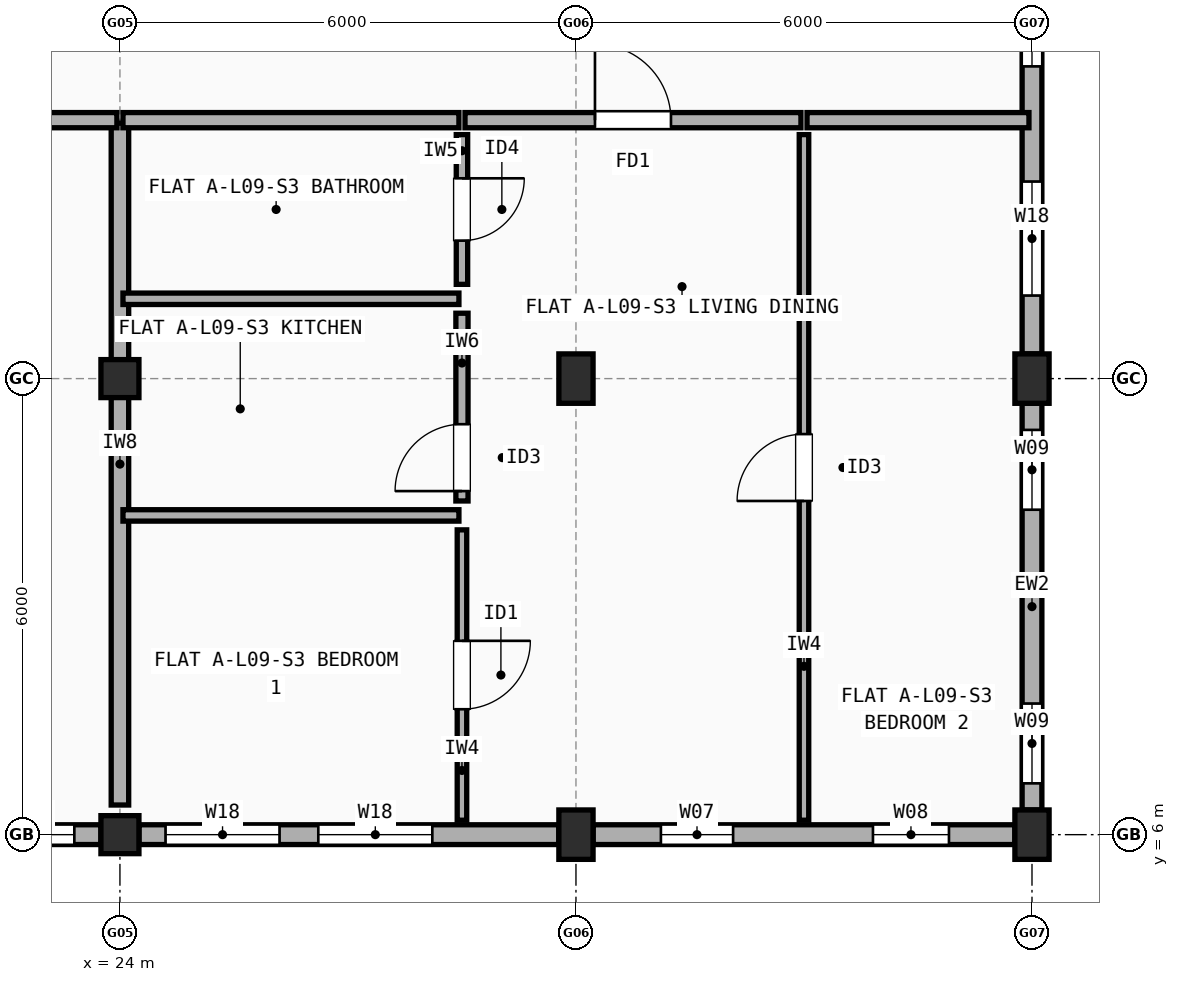
"""IFC4 building model, lengths in metres.
Left out: names, types, materials, properties, quantities, classifications, styles, units other than length and angle.
Written with IfcOpenShell. Run it as: python <this file> out.ifc"""

import sys

from ifc_helpers import new_model, si_unit, direction, frame, frame_2d, origin, origin_2d, place, context, subcontext, project, spatial, rectangle, extrude, element, fill, save


model = new_model("IFC4")
c1 = context("Model", 3, precision=1e-05, world=origin(), true_north=direction((0.0, 1.0)))
c2 = subcontext(c1, "Body", "Model", "MODEL_VIEW")
j1 = project(units=[si_unit("LENGTHUNIT", "METRE"), si_unit("PLANEANGLEUNIT", "RADIAN")], contexts=[c1])
p1 = place(None, origin())
s1 = spatial("IfcSite", under=j1, at=p1, CompositionType="ELEMENT")
p2 = place(p1, origin())
s2 = spatial("IfcBuilding", under=s1, at=p2, CompositionType="ELEMENT")
p3 = place(p2, frame((0.0, 0.0, 30.1)))
s3 = spatial("IfcBuildingStorey", under=s2, at=p3, CompositionType="ELEMENT", Elevation=30.1)
for number, where, z_axis, x_axis in (
    (1, (24.0, 6.0, 0.0), (0.0, 0.0, 1.0), (1.0, 0.0, 0.0)),
    (2, (24.0, 12.0, 0.0), (0.0, 0.0, 1.0), (1.0, 0.0, 0.0)),
):
    element("IfcColumn", number, at=place(p3, frame(where, z_axis=z_axis, x_axis=x_axis)), inside=s3, PredefinedType="COLUMN", context=c2, shape_type="SweptSolid", body=[
        extrude(rectangle(XDim=0.5, YDim=0.5, at=origin_2d()), origin(), (0.0, 0.0, 1.0), 2.985),
    ])
for number, where, z_axis, x_axis in (
    (3, (30.0, 6.0, 0.0), (0.0, 0.0, 1.0), (1.0, 0.0, 0.0)),
    (4, (30.0, 12.0, 0.0), (0.0, 0.0, 1.0), (1.0, 0.0, 0.0)),
    (5, (36.0, 6.0, 0.0), (0.0, 0.0, 1.0), (1.0, 0.0, 0.0)),
    (6, (36.0, 12.0, 0.0), (0.0, 0.0, 1.0), (1.0, 0.0, 0.0)),
):
    element("IfcColumn", number, at=place(p3, frame(where, z_axis=z_axis, x_axis=x_axis)), inside=s3, PredefinedType="COLUMN", context=c2, shape_type="SweptSolid", body=[
        extrude(rectangle(XDim=0.45, YDim=0.65, at=origin_2d()), origin(), (0.0, 0.0, 1.0), 2.985),
    ])
p4 = place(p3, frame((18.25, 6.0, 0.0), z_axis=(0.0, 0.0, 1.0), x_axis=(1.0, 0.0, 0.0)))
e7 = element("IfcWall", 7, at=p4, inside=s3, PredefinedType="STANDARD", context=c2, shape_type="SweptSolid", body=[
    extrude(rectangle(XDim=5.5, YDim=0.26, at=frame_2d((2.75, 0.0))), origin(), (0.0, 0.0, 1.0), 2.467),
])
p5 = place(p4, frame((0.35, 0.0, 0.9)))
e8 = element("IfcOpeningElement", 8, at=p5, cuts=e7, PredefinedType="OPENING", context=c2, shape_type="SweptSolid", body=[
    extrude(rectangle(XDim=1.05, YDim=1.35, at=frame_2d((0.525, 0.675))), frame((0.0, 0.14, 0.0), z_axis=(0.0, -1.0, 0.0), x_axis=(1.0, 0.0, 0.0)), (0.0, 0.0, 1.0), 0.28),
])
p6 = place(p4, frame((4.1, 0.0, 0.9)))
e9 = element("IfcOpeningElement", 9, at=p6, cuts=e7, PredefinedType="OPENING", context=c2, shape_type="SweptSolid", body=[
    extrude(rectangle(XDim=1.05, YDim=1.35, at=frame_2d((0.525, 0.675))), frame((0.0, 0.14, 0.0), z_axis=(0.0, -1.0, 0.0), x_axis=(1.0, 0.0, 0.0)), (0.0, 0.0, 1.0), 0.28),
])
p7 = place(p3, frame((24.25, 6.0, 0.0), z_axis=(0.0, 0.0, 1.0), x_axis=(1.0, 0.0, 0.0)))
e10 = element("IfcWall", 10, at=p7, inside=s3, PredefinedType="STANDARD", context=c2, shape_type="SweptSolid", body=[
    extrude(rectangle(XDim=5.525, YDim=0.26, at=frame_2d((2.762, 0.0))), origin(), (0.0, 0.0, 1.0), 2.467),
])
p8 = place(p7, frame((0.35, 0.0, 0.9)))
e11 = element("IfcOpeningElement", 11, at=p8, cuts=e10, PredefinedType="OPENING", context=c2, shape_type="SweptSolid", body=[
    extrude(rectangle(XDim=1.5, YDim=1.4, at=frame_2d((0.75, 0.7))), frame((0.0, 0.14, 0.0), z_axis=(0.0, -1.0, 0.0), x_axis=(1.0, 0.0, 0.0)), (0.0, 0.0, 1.0), 0.28),
])
p9 = place(p7, frame((2.36, 0.0, 0.9)))
e12 = element("IfcOpeningElement", 12, at=p9, cuts=e10, PredefinedType="OPENING", context=c2, shape_type="SweptSolid", body=[
    extrude(rectangle(XDim=1.5, YDim=1.4, at=frame_2d((0.75, 0.7))), frame((0.0, 0.14, 0.0), z_axis=(0.0, -1.0, 0.0), x_axis=(1.0, 0.0, 0.0)), (0.0, 0.0, 1.0), 0.28),
])
p10 = place(p3, frame((30.225, 6.0, 0.0), z_axis=(0.0, 0.0, 1.0), x_axis=(1.0, 0.0, 0.0)))
e13 = element("IfcWall", 13, at=p10, inside=s3, PredefinedType="STANDARD", context=c2, shape_type="SweptSolid", body=[
    extrude(rectangle(XDim=5.55, YDim=0.26, at=frame_2d((2.775, 0.0))), origin(), (0.0, 0.0, 1.0), 2.467),
])
p11 = place(p10, frame((0.893, 0.0, 0.9)))
e14 = element("IfcOpeningElement", 14, at=p11, cuts=e13, PredefinedType="OPENING", context=c2, shape_type="SweptSolid", body=[
    extrude(rectangle(XDim=0.95, YDim=1.35, at=frame_2d((0.475, 0.675))), frame((0.0, 0.14, 0.0), z_axis=(0.0, -1.0, 0.0), x_axis=(1.0, 0.0, 0.0)), (0.0, 0.0, 1.0), 0.28),
])
p12 = place(p10, frame((3.683, 0.0, 0.9)))
e15 = element("IfcOpeningElement", 15, at=p12, cuts=e13, PredefinedType="OPENING", context=c2, shape_type="SweptSolid", body=[
    extrude(rectangle(XDim=1.0, YDim=1.4, at=frame_2d((0.5, 0.7))), frame((0.0, 0.14, 0.0), z_axis=(0.0, -1.0, 0.0), x_axis=(1.0, 0.0, 0.0)), (0.0, 0.0, 1.0), 0.28),
])
p13 = place(p3, frame((36.0, 6.325, 0.0), z_axis=(0.0, 0.0, 1.0), x_axis=(0.0, 1.0, 0.0)))
e16 = element("IfcWall", 16, at=p13, inside=s3, PredefinedType="STANDARD", context=c2, shape_type="SweptSolid", body=[
    extrude(rectangle(XDim=5.35, YDim=0.26, at=frame_2d((2.675, 0.0))), origin(), (0.0, 0.0, 1.0), 2.467),
])
p14 = place(p13, frame((0.35, 0.0, 0.9)))
e17 = element("IfcOpeningElement", 17, at=p14, cuts=e16, PredefinedType="OPENING", context=c2, shape_type="SweptSolid", body=[
    extrude(rectangle(XDim=1.05, YDim=1.35, at=frame_2d((0.525, 0.675))), frame((0.0, 0.14, 0.0), z_axis=(0.0, -1.0, 0.0), x_axis=(1.0, 0.0, 0.0)), (0.0, 0.0, 1.0), 0.28),
])
p15 = place(p13, frame((3.95, 0.0, 0.9)))
e18 = element("IfcOpeningElement", 18, at=p15, cuts=e16, PredefinedType="OPENING", context=c2, shape_type="SweptSolid", body=[
    extrude(rectangle(XDim=1.05, YDim=1.35, at=frame_2d((0.525, 0.675))), frame((0.0, 0.14, 0.0), z_axis=(0.0, -1.0, 0.0), x_axis=(1.0, 0.0, 0.0)), (0.0, 0.0, 1.0), 0.28),
])
p16 = place(p3, frame((36.0, 12.325, 0.0), z_axis=(0.0, 0.0, 1.0), x_axis=(0.0, 1.0, 0.0)))
e19 = element("IfcWall", 19, at=p16, inside=s3, PredefinedType="STANDARD", context=c2, shape_type="SweptSolid", body=[
    extrude(rectangle(XDim=5.35, YDim=0.26, at=frame_2d((2.675, 0.0))), origin(), (0.0, 0.0, 1.0), 2.467),
])
p17 = place(p16, frame((0.768, 0.0, 0.9)))
e20 = element("IfcOpeningElement", 20, at=p17, cuts=e19, PredefinedType="OPENING", context=c2, shape_type="SweptSolid", body=[
    extrude(rectangle(XDim=1.5, YDim=1.4, at=frame_2d((0.75, 0.7))), frame((0.0, 0.14, 0.0), z_axis=(0.0, -1.0, 0.0), x_axis=(1.0, 0.0, 0.0)), (0.0, 0.0, 1.0), 0.28),
])
p18 = place(p16, frame((3.782, 0.0, 0.9)))
e21 = element("IfcOpeningElement", 21, at=p18, cuts=e19, PredefinedType="OPENING", context=c2, shape_type="SweptSolid", body=[
    extrude(rectangle(XDim=0.9, YDim=1.4, at=frame_2d((0.45, 0.7))), frame((0.0, 0.14, 0.0), z_axis=(0.0, -1.0, 0.0), x_axis=(1.0, 0.0, 0.0)), (0.0, 0.0, 1.0), 0.28),
])
p19 = place(p3, frame((24.0, 6.39, 0.0), z_axis=(0.0, 0.0, 1.0), x_axis=(0.0, 1.0, 0.0)))
e22 = element("IfcWall", 22, at=p19, inside=s3, PredefinedType="SOLIDWALL", context=c2, shape_type="SweptSolid", body=[
    extrude(rectangle(XDim=8.97, YDim=0.23, at=frame_2d((4.485, 0.0))), origin(), (0.0, 0.0, 1.0), 2.458),
])
p20 = place(p3, frame((18.04, 15.4, 0.0), z_axis=(0.0, 0.0, 1.0), x_axis=(1.0, 0.0, 0.0)))
e23 = element("IfcWall", 23, at=p20, inside=s3, PredefinedType="SOLIDWALL", context=c2, shape_type="SweptSolid", body=[
    extrude(rectangle(XDim=5.92, YDim=0.2, at=frame_2d((2.96, 0.0))), origin(), (0.0, 0.0, 1.0), 2.458),
])
p21 = place(p20, frame((2.435, 0.0, 0.0)))
e24 = element("IfcOpeningElement", 24, at=p21, cuts=e23, PredefinedType="OPENING", context=c2, shape_type="SweptSolid", body=[
    extrude(rectangle(XDim=1.05, YDim=2.15, at=frame_2d((0.525, 1.075))), frame((0.0, 0.11, 0.0), z_axis=(0.0, -1.0, 0.0), x_axis=(1.0, 0.0, 0.0)), (0.0, 0.0, 1.0), 0.22),
])
p22 = place(p3, frame((24.04, 15.4, 0.0), z_axis=(0.0, 0.0, 1.0), x_axis=(1.0, 0.0, 0.0)))
e25 = element("IfcWall", 25, at=p22, inside=s3, PredefinedType="SOLIDWALL", context=c2, shape_type="SweptSolid", body=[
    extrude(rectangle(XDim=4.42, YDim=0.2, at=frame_2d((2.21, 0.0))), origin(), (0.0, 0.0, 1.0), 2.458),
])
p23 = place(p3, frame((28.54, 15.4, 0.0), z_axis=(0.0, 0.0, 1.0), x_axis=(1.0, 0.0, 0.0)))
e26 = element("IfcWall", 26, at=p23, inside=s3, PredefinedType="SOLIDWALL", context=c2, shape_type="SweptSolid", body=[
    extrude(rectangle(XDim=4.42, YDim=0.2, at=frame_2d((2.21, 0.0))), origin(), (0.0, 0.0, 1.0), 2.467),
])
p24 = place(p23, frame((1.71, 0.0, 0.0)))
e27 = element("IfcOpeningElement", 27, at=p24, cuts=e26, PredefinedType="OPENING", context=c2, shape_type="SweptSolid", body=[
    extrude(rectangle(XDim=1.0, YDim=2.15, at=frame_2d((0.5, 1.075))), frame((0.0, 0.11, 0.0), z_axis=(0.0, -1.0, 0.0), x_axis=(1.0, 0.0, 0.0)), (0.0, 0.0, 1.0), 0.22),
])
p25 = place(p3, frame((28.5, 6.19, 0.0), z_axis=(0.0, 0.0, 1.0), x_axis=(0.0, 1.0, 0.0)))
e28 = element("IfcWall", 28, at=p25, inside=s3, PredefinedType="PARTITIONING", context=c2, shape_type="SweptSolid", body=[
    extrude(rectangle(XDim=3.82, YDim=0.125, at=frame_2d((1.91, 0.0))), origin(), (0.0, 0.0, 1.0), 2.985),
])
p26 = place(p25, frame((1.46, 0.0, 0.0)))
e29 = element("IfcOpeningElement", 29, at=p26, cuts=e28, PredefinedType="OPENING", context=c2, shape_type="SweptSolid", body=[
    extrude(rectangle(XDim=0.9, YDim=2.1, at=frame_2d((0.45, 1.05))), frame((0.0, 0.073, 0.0), z_axis=(0.0, -1.0, 0.0), x_axis=(1.0, 0.0, 0.0)), (0.0, 0.0, 1.0), 0.145),
])
p27 = place(p3, frame((28.5, 10.39, 0.0), z_axis=(0.0, 0.0, 1.0), x_axis=(0.0, 1.0, 0.0)))
e30 = element("IfcWall", 30, at=p27, inside=s3, PredefinedType="PLUMBINGWALL", context=c2, shape_type="SweptSolid", body=[
    extrude(rectangle(XDim=2.47, YDim=0.16, at=frame_2d((1.235, 0.0))), origin(), (0.0, 0.0, 1.0), 2.548),
])
p28 = place(p27, frame((0.13, 0.0, 0.0)))
e31 = element("IfcOpeningElement", 31, at=p28, cuts=e30, PredefinedType="OPENING", context=c2, shape_type="SweptSolid", body=[
    extrude(rectangle(XDim=0.88, YDim=2.1, at=frame_2d((0.44, 1.05))), frame((0.0, 0.09, 0.0), z_axis=(0.0, -1.0, 0.0), x_axis=(1.0, 0.0, 0.0)), (0.0, 0.0, 1.0), 0.18),
])
p29 = place(p3, frame((28.5, 13.24, 0.0), z_axis=(0.0, 0.0, 1.0), x_axis=(0.0, 1.0, 0.0)))
e32 = element("IfcWall", 32, at=p29, inside=s3, PredefinedType="PARTITIONING", context=c2, shape_type="SweptSolid", body=[
    extrude(rectangle(XDim=1.97, YDim=0.15, at=frame_2d((0.985, 0.0))), origin(), (0.0, 0.0, 1.0), 2.985),
])
p30 = place(p29, frame((0.575, 0.0, 0.0)))
e33 = element("IfcOpeningElement", 33, at=p30, cuts=e32, PredefinedType="OPENING", context=c2, shape_type="SweptSolid", body=[
    extrude(rectangle(XDim=0.82, YDim=2.08, at=frame_2d((0.41, 1.04))), frame((0.0, 0.085, 0.0), z_axis=(0.0, -1.0, 0.0), x_axis=(1.0, 0.0, 0.0)), (0.0, 0.0, 1.0), 0.17),
])
p31 = place(p3, frame((24.04, 10.2, 0.0), z_axis=(0.0, 0.0, 1.0), x_axis=(1.0, 0.0, 0.0)))
e34 = element("IfcWall", 34, at=p31, inside=s3, PredefinedType="PARTITIONING", context=c2, shape_type="SweptSolid", body=[
    extrude(rectangle(XDim=4.42, YDim=0.15, at=frame_2d((2.21, 0.0))), origin(), (0.0, 0.0, 1.0), 2.508),
])
p32 = place(p3, frame((24.04, 13.05, 0.0), z_axis=(0.0, 0.0, 1.0), x_axis=(1.0, 0.0, 0.0)))
e35 = element("IfcWall", 35, at=p32, inside=s3, PredefinedType="PARTITIONING", context=c2, shape_type="SweptSolid", body=[
    extrude(rectangle(XDim=4.42, YDim=0.15, at=frame_2d((2.21, 0.0))), origin(), (0.0, 0.0, 1.0), 2.458),
])
p33 = place(p3, frame((33.04, 15.4, 0.0), z_axis=(0.0, 0.0, 1.0), x_axis=(1.0, 0.0, 0.0)))
e36 = element("IfcWall", 36, at=p33, inside=s3, PredefinedType="SOLIDWALL", context=c2, shape_type="SweptSolid", body=[
    extrude(rectangle(XDim=2.92, YDim=0.2, at=frame_2d((1.46, 0.0))), origin(), (0.0, 0.0, 1.0), 2.467),
])
p34 = place(p3, frame((33.0, 6.19, 0.0), z_axis=(0.0, 0.0, 1.0), x_axis=(0.0, 1.0, 0.0)))
e37 = element("IfcWall", 37, at=p34, inside=s3, PredefinedType="PARTITIONING", context=c2, shape_type="SweptSolid", body=[
    extrude(rectangle(XDim=9.02, YDim=0.125, at=frame_2d((4.51, 0.0))), origin(), (0.0, 0.0, 1.0), 2.508),
])
p35 = place(p34, frame((4.2, 0.0, 0.0)))
e38 = element("IfcOpeningElement", 38, at=p35, cuts=e37, PredefinedType="OPENING", context=c2, shape_type="SweptSolid", body=[
    extrude(rectangle(XDim=0.88, YDim=2.1, at=frame_2d((0.44, 1.05))), frame((0.0, 0.073, 0.0), z_axis=(0.0, -1.0, 0.0), x_axis=(1.0, 0.0, 0.0)), (0.0, 0.0, 1.0), 0.145),
])
p36 = place(p6, origin())
e39 = element("IfcWindow", 39, at=p36, inside=s3, PartitioningType="SINGLE_PANEL", PredefinedType="WINDOW", context=c2, shape_type="SweptSolid", body=[
    extrude(rectangle(XDim=1.05, YDim=1.35, at=frame_2d((0.525, 0.675))), frame((0.0, 0.03, 0.0), z_axis=(0.0, -1.0, 0.0), x_axis=(1.0, 0.0, 0.0)), (0.0, 0.0, 1.0), 0.06),
])
fill(e9, e39)
p37 = place(p8, origin())
e40 = element("IfcWindow", 40, at=p37, inside=s3, PartitioningType="SINGLE_PANEL", PredefinedType="WINDOW", context=c2, shape_type="SweptSolid", body=[
    extrude(rectangle(XDim=1.5, YDim=1.4, at=frame_2d((0.75, 0.7))), frame((0.0, 0.03, 0.0), z_axis=(0.0, -1.0, 0.0), x_axis=(1.0, 0.0, 0.0)), (0.0, 0.0, 1.0), 0.06),
])
fill(e11, e40)
p38 = place(p9, origin())
e41 = element("IfcWindow", 41, at=p38, inside=s3, PartitioningType="SINGLE_PANEL", PredefinedType="WINDOW", context=c2, shape_type="SweptSolid", body=[
    extrude(rectangle(XDim=1.5, YDim=1.4, at=frame_2d((0.75, 0.7))), frame((0.0, 0.03, 0.0), z_axis=(0.0, -1.0, 0.0), x_axis=(1.0, 0.0, 0.0)), (0.0, 0.0, 1.0), 0.06),
])
fill(e12, e41)
p39 = place(p11, origin())
e42 = element("IfcWindow", 42, at=p39, inside=s3, PartitioningType="SINGLE_PANEL", PredefinedType="WINDOW", context=c2, shape_type="SweptSolid", body=[
    extrude(rectangle(XDim=0.95, YDim=1.35, at=frame_2d((0.475, 0.675))), frame((0.0, 0.03, 0.0), z_axis=(0.0, -1.0, 0.0), x_axis=(1.0, 0.0, 0.0)), (0.0, 0.0, 1.0), 0.06),
])
fill(e14, e42)
p40 = place(p12, origin())
e43 = element("IfcWindow", 43, at=p40, inside=s3, PartitioningType="SINGLE_PANEL", PredefinedType="WINDOW", context=c2, shape_type="SweptSolid", body=[
    extrude(rectangle(XDim=1.0, YDim=1.4, at=frame_2d((0.5, 0.7))), frame((0.0, 0.03, 0.0), z_axis=(0.0, -1.0, 0.0), x_axis=(1.0, 0.0, 0.0)), (0.0, 0.0, 1.0), 0.06),
])
fill(e15, e43)
p41 = place(p14, origin())
e44 = element("IfcWindow", 44, at=p41, inside=s3, PartitioningType="SINGLE_PANEL", PredefinedType="WINDOW", context=c2, shape_type="SweptSolid", body=[
    extrude(rectangle(XDim=1.05, YDim=1.35, at=frame_2d((0.525, 0.675))), frame((0.0, 0.03, 0.0), z_axis=(0.0, -1.0, 0.0), x_axis=(1.0, 0.0, 0.0)), (0.0, 0.0, 1.0), 0.06),
])
fill(e17, e44)
p42 = place(p15, origin())
e45 = element("IfcWindow", 45, at=p42, inside=s3, PartitioningType="SINGLE_PANEL", PredefinedType="WINDOW", context=c2, shape_type="SweptSolid", body=[
    extrude(rectangle(XDim=1.05, YDim=1.35, at=frame_2d((0.525, 0.675))), frame((0.0, 0.03, 0.0), z_axis=(0.0, -1.0, 0.0), x_axis=(1.0, 0.0, 0.0)), (0.0, 0.0, 1.0), 0.06),
])
fill(e18, e45)
p43 = place(p17, origin())
e46 = element("IfcWindow", 46, at=p43, inside=s3, PartitioningType="SINGLE_PANEL", PredefinedType="WINDOW", context=c2, shape_type="SweptSolid", body=[
    extrude(rectangle(XDim=1.5, YDim=1.4, at=frame_2d((0.75, 0.7))), frame((0.0, 0.03, 0.0), z_axis=(0.0, -1.0, 0.0), x_axis=(1.0, 0.0, 0.0)), (0.0, 0.0, 1.0), 0.06),
])
fill(e20, e46)
p44 = place(p18, origin())
e47 = element("IfcWindow", 47, at=p44, inside=s3, PartitioningType="SINGLE_PANEL", PredefinedType="WINDOW", context=c2, shape_type="SweptSolid", body=[
    extrude(rectangle(XDim=0.9, YDim=1.4, at=frame_2d((0.45, 0.7))), frame((0.0, 0.03, 0.0), z_axis=(0.0, -1.0, 0.0), x_axis=(1.0, 0.0, 0.0)), (0.0, 0.0, 1.0), 0.06),
])
fill(e21, e47)
p45 = place(p24, origin())
e48 = element("IfcDoor", 48, at=p45, inside=s3, OperationType="SINGLE_SWING_LEFT", PredefinedType="DOOR", context=c2, shape_type="SweptSolid", body=[
    extrude(rectangle(XDim=1.0, YDim=2.15, at=frame_2d((0.5, 1.075))), frame((0.0, 0.025, 0.0), z_axis=(0.0, -1.0, 0.0), x_axis=(1.0, 0.0, 0.0)), (0.0, 0.0, 1.0), 0.05),
])
fill(e27, e48)
p46 = place(p26, origin())
e49 = element("IfcDoor", 49, at=p46, inside=s3, OperationType="SINGLE_SWING_RIGHT", PredefinedType="DOOR", context=c2, shape_type="SweptSolid", body=[
    extrude(rectangle(XDim=0.9, YDim=2.1, at=frame_2d((0.45, 1.05))), frame((0.0, 0.025, 0.0), z_axis=(0.0, -1.0, 0.0), x_axis=(1.0, 0.0, 0.0)), (0.0, 0.0, 1.0), 0.05),
])
fill(e29, e49)
p47 = place(p28, origin())
e50 = element("IfcDoor", 50, at=p47, inside=s3, OperationType="SINGLE_SWING_LEFT", PredefinedType="DOOR", context=c2, shape_type="SweptSolid", body=[
    extrude(rectangle(XDim=0.88, YDim=2.1, at=frame_2d((0.44, 1.05))), frame((0.0, 0.025, 0.0), z_axis=(0.0, -1.0, 0.0), x_axis=(1.0, 0.0, 0.0)), (0.0, 0.0, 1.0), 0.05),
])
fill(e31, e50)
p48 = place(p30, origin())
e51 = element("IfcDoor", 51, at=p48, inside=s3, OperationType="SINGLE_SWING_RIGHT", PredefinedType="DOOR", context=c2, shape_type="SweptSolid", body=[
    extrude(rectangle(XDim=0.82, YDim=2.08, at=frame_2d((0.41, 1.04))), frame((0.0, 0.025, 0.0), z_axis=(0.0, -1.0, 0.0), x_axis=(1.0, 0.0, 0.0)), (0.0, 0.0, 1.0), 0.05),
])
fill(e33, e51)
p49 = place(p35, origin())
e52 = element("IfcDoor", 52, at=p49, inside=s3, OperationType="SINGLE_SWING_LEFT", PredefinedType="DOOR", context=c2, shape_type="SweptSolid", body=[
    extrude(rectangle(XDim=0.88, YDim=2.1, at=frame_2d((0.44, 1.05))), frame((0.0, 0.025, 0.0), z_axis=(0.0, -1.0, 0.0), x_axis=(1.0, 0.0, 0.0)), (0.0, 0.0, 1.0), 0.05),
])
fill(e38, e52)
save(model, sys.argv[1])
